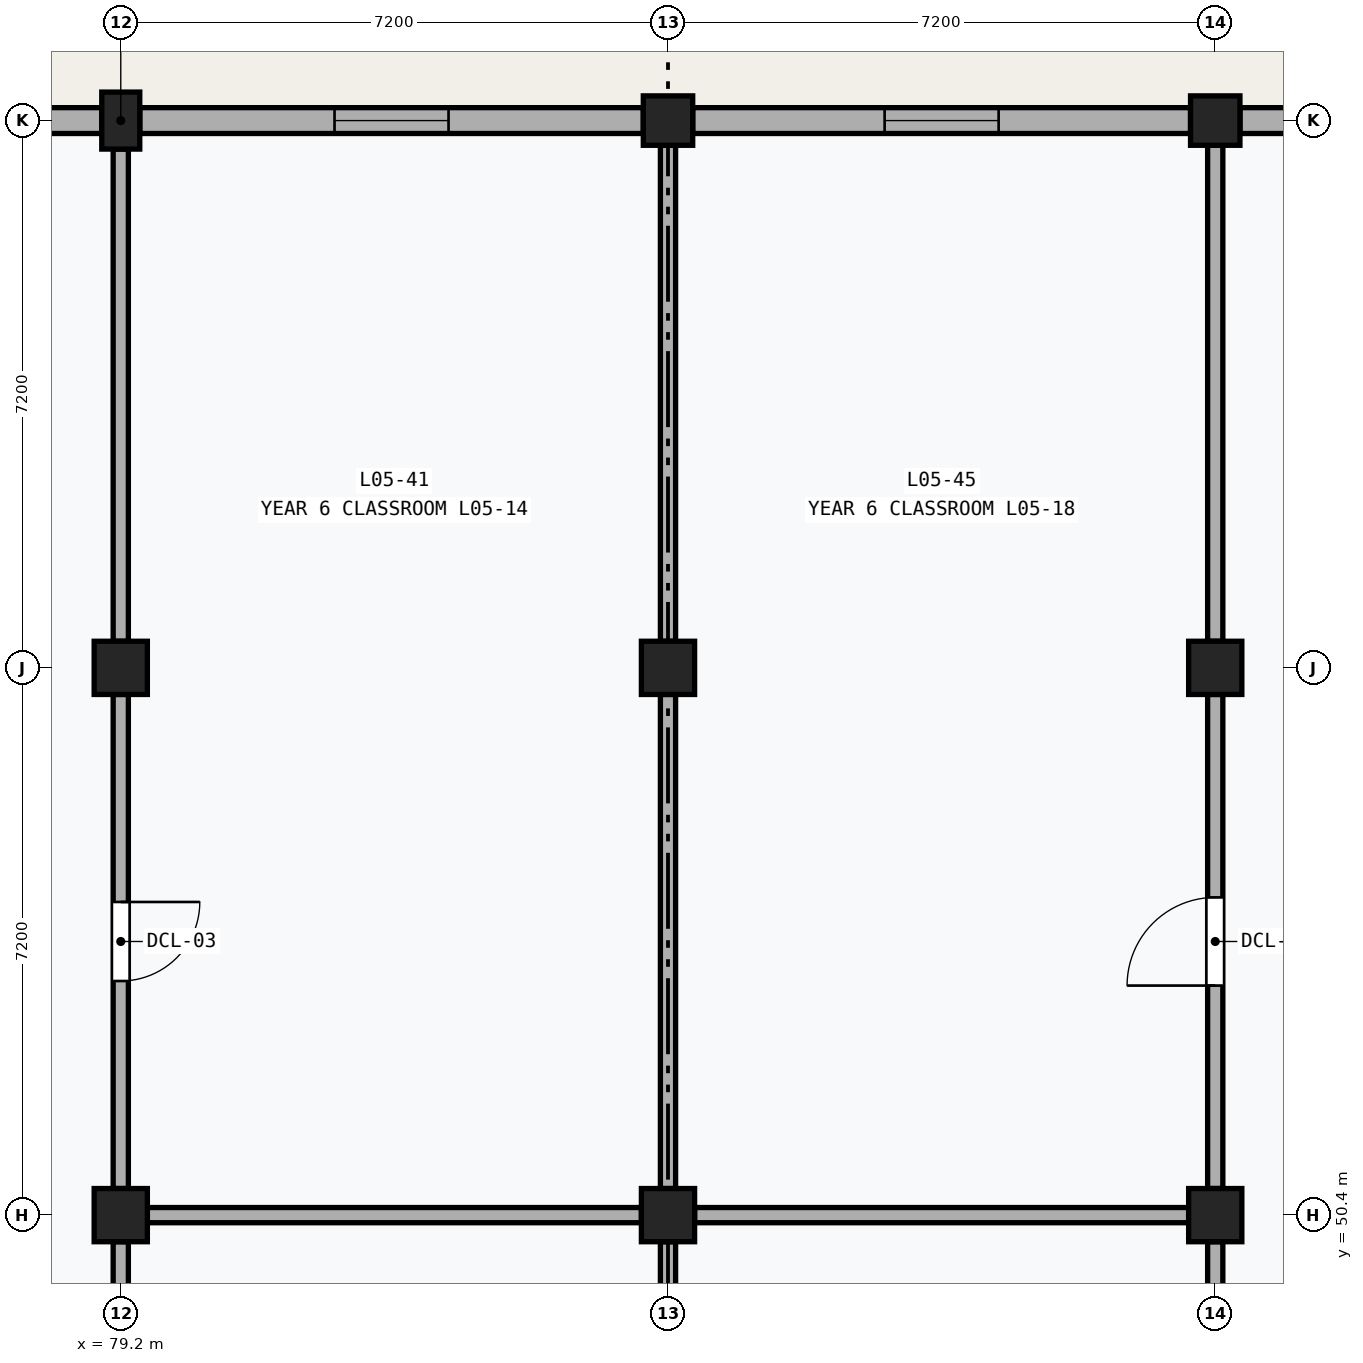
"""IFC4 building model, lengths in metres.
Left out: names, types, materials, properties, quantities, classifications, styles, units other than length and angle.
Written with IfcOpenShell. Run it as: python <this file> out.ifc"""

import sys

from ifc_helpers import new_model, si_unit, direction, frame, frame_2d, origin, origin_2d, place, context, subcontext, project, spatial, rectangle, extrude, element, fill, save


model = new_model("IFC4")
c1 = context("Model", 3, precision=1e-05, world=origin(), true_north=direction((0.0, 1.0)))
c2 = subcontext(c1, "Body", "Model", "MODEL_VIEW")
j1 = project(units=[si_unit("LENGTHUNIT", "METRE"), si_unit("PLANEANGLEUNIT", "RADIAN")], contexts=[c1])
p1 = place(None, origin())
s1 = spatial("IfcSite", under=j1, at=p1, CompositionType="ELEMENT")
p2 = place(p1, origin())
s2 = spatial("IfcBuilding", under=s1, at=p2, CompositionType="ELEMENT")
p3 = place(p2, frame((0.0, 0.0, 22.6)))
s3 = spatial("IfcBuildingStorey", under=s2, at=p3, CompositionType="ELEMENT", Elevation=22.6)
for number, where, z_axis, x_axis in (
    (1, (79.2, 50.4, 0.0), (0.0, 0.0, 1.0), (1.0, 0.0, 0.0)),
    (2, (79.2, 57.6, 0.0), (0.0, 0.0, 1.0), (1.0, 0.0, 0.0)),
):
    element("IfcColumn", number, at=place(p3, frame(where, z_axis=z_axis, x_axis=x_axis)), inside=s3, PredefinedType="COLUMN", context=c2, shape_type="SweptSolid", body=[
        extrude(rectangle(XDim=0.7, YDim=0.7, at=origin_2d()), origin(), (0.0, 0.0, 1.0), 4.0),
    ])
p4 = place(p3, frame((79.2, 64.8, 0.0), z_axis=(0.0, 0.0, 1.0), x_axis=(1.0, 0.0, 0.0)))
e3 = element("IfcColumn", 3, at=p4, inside=s3, PredefinedType="PILASTER", context=c2, shape_type="SweptSolid", body=[
    extrude(rectangle(XDim=0.5, YDim=0.75, at=origin_2d()), origin(), (0.0, 0.0, 1.0), 4.0),
])
for number, where, z_axis, x_axis in (
    (4, (86.4, 50.4, 0.0), (0.0, 0.0, 1.0), (1.0, 0.0, 0.0)),
    (5, (86.4, 57.6, 0.0), (0.0, 0.0, 1.0), (1.0, 0.0, 0.0)),
):
    element("IfcColumn", number, at=place(p3, frame(where, z_axis=z_axis, x_axis=x_axis)), inside=s3, PredefinedType="COLUMN", context=c2, shape_type="SweptSolid", body=[
        extrude(rectangle(XDim=0.7, YDim=0.7, at=origin_2d()), origin(), (0.0, 0.0, 1.0), 4.0),
    ])
p5 = place(p3, frame((86.4, 64.8, 0.0), z_axis=(0.0, 0.0, 1.0), x_axis=(1.0, 0.0, 0.0)))
e6 = element("IfcColumn", 6, at=p5, inside=s3, PredefinedType="COLUMN", context=c2, shape_type="SweptSolid", body=[
    extrude(rectangle(XDim=0.65, YDim=0.65, at=origin_2d()), origin(), (0.0, 0.0, 1.0), 4.0),
])
for number, where, z_axis, x_axis in (
    (7, (93.6, 50.4, 0.0), (0.0, 0.0, 1.0), (1.0, 0.0, 0.0)),
    (8, (93.6, 57.6, 0.0), (0.0, 0.0, 1.0), (1.0, 0.0, 0.0)),
):
    element("IfcColumn", number, at=place(p3, frame(where, z_axis=z_axis, x_axis=x_axis)), inside=s3, PredefinedType="COLUMN", context=c2, shape_type="SweptSolid", body=[
        extrude(rectangle(XDim=0.7, YDim=0.7, at=origin_2d()), origin(), (0.0, 0.0, 1.0), 4.0),
    ])
p6 = place(p3, frame((93.6, 64.8, 0.0), z_axis=(0.0, 0.0, 1.0), x_axis=(1.0, 0.0, 0.0)))
e9 = element("IfcColumn", 9, at=p6, inside=s3, PredefinedType="COLUMN", context=c2, shape_type="SweptSolid", body=[
    extrude(rectangle(XDim=0.65, YDim=0.65, at=origin_2d()), origin(), (0.0, 0.0, 1.0), 4.0),
])
p7 = place(p3, frame((72.325, 64.8, 0.0), z_axis=(0.0, 0.0, 1.0), x_axis=(1.0, 0.0, 0.0)))
e10 = element("IfcWall", 10, at=p7, inside=s3, PredefinedType="SOLIDWALL", context=c2, shape_type="SweptSolid", body=[
    extrude(rectangle(XDim=6.625, YDim=0.34, at=frame_2d((3.312, 0.0))), origin(), (0.0, 0.0, 1.0), 3.12),
])
p8 = place(p7, frame((2.562, 0.0, 1.1)))
e11 = element("IfcOpeningElement", 11, at=p8, cuts=e10, PredefinedType="OPENING", context=c2, shape_type="SweptSolid", body=[
    extrude(rectangle(XDim=1.5, YDim=1.35, at=frame_2d((0.75, 0.675))), frame((0.0, 0.182, 0.0), z_axis=(0.0, -1.0, 0.0), x_axis=(1.0, 0.0, 0.0)), (0.0, 0.0, 1.0), 0.364),
])
p9 = place(p3, frame((79.45, 64.8, 0.0), z_axis=(0.0, 0.0, 1.0), x_axis=(1.0, 0.0, 0.0)))
e12 = element("IfcWall", 12, at=p9, inside=s3, PredefinedType="SOLIDWALL", context=c2, shape_type="SweptSolid", body=[
    extrude(rectangle(XDim=6.625, YDim=0.34, at=frame_2d((3.312, 0.0))), origin(), (0.0, 0.0, 1.0), 3.12),
])
p10 = place(p9, frame((2.562, 0.0, 1.1)))
e13 = element("IfcOpeningElement", 13, at=p10, cuts=e12, PredefinedType="OPENING", context=c2, shape_type="SweptSolid", body=[
    extrude(rectangle(XDim=1.5, YDim=1.35, at=frame_2d((0.75, 0.675))), frame((0.0, 0.182, 0.0), z_axis=(0.0, -1.0, 0.0), x_axis=(1.0, 0.0, 0.0)), (0.0, 0.0, 1.0), 0.364),
])
p11 = place(p3, frame((86.725, 64.8, 0.0), z_axis=(0.0, 0.0, 1.0), x_axis=(1.0, 0.0, 0.0)))
e14 = element("IfcWall", 14, at=p11, inside=s3, PredefinedType="SOLIDWALL", context=c2, shape_type="SweptSolid", body=[
    extrude(rectangle(XDim=6.55, YDim=0.34, at=frame_2d((3.275, 0.0))), origin(), (0.0, 0.0, 1.0), 3.12),
])
p12 = place(p11, frame((2.525, 0.0, 1.1)))
e15 = element("IfcOpeningElement", 15, at=p12, cuts=e14, PredefinedType="OPENING", context=c2, shape_type="SweptSolid", body=[
    extrude(rectangle(XDim=1.5, YDim=1.35, at=frame_2d((0.75, 0.675))), frame((0.0, 0.182, 0.0), z_axis=(0.0, -1.0, 0.0), x_axis=(1.0, 0.0, 0.0)), (0.0, 0.0, 1.0), 0.364),
])
p13 = place(p3, frame((93.925, 64.8, 0.0), z_axis=(0.0, 0.0, 1.0), x_axis=(1.0, 0.0, 0.0)))
e16 = element("IfcWall", 16, at=p13, inside=s3, PredefinedType="SOLIDWALL", context=c2, shape_type="SweptSolid", body=[
    extrude(rectangle(XDim=6.55, YDim=0.34, at=frame_2d((3.275, 0.0))), origin(), (0.0, 0.0, 1.0), 3.12),
])
p14 = place(p13, frame((2.525, 0.0, 1.1)))
e17 = element("IfcOpeningElement", 17, at=p14, cuts=e16, PredefinedType="OPENING", context=c2, shape_type="SweptSolid", body=[
    extrude(rectangle(XDim=1.5, YDim=1.35, at=frame_2d((0.75, 0.675))), frame((0.0, 0.182, 0.0), z_axis=(0.0, -1.0, 0.0), x_axis=(1.0, 0.0, 0.0)), (0.0, 0.0, 1.0), 0.364),
])
for number, where, z_axis, x_axis in (
    (18, (79.55, 50.4, 0.0), (0.0, 0.0, 1.0), (1.0, 0.0, 0.0)),
    (19, (79.2, 43.55, 0.0), (0.0, 0.0, 1.0), (0.0, 1.0, 0.0)),
    (20, (86.4, 43.55, 0.0), (0.0, 0.0, 1.0), (0.0, 1.0, 0.0)),
):
    element("IfcWall", number, at=place(p3, frame(where, z_axis=z_axis, x_axis=x_axis)), inside=s3, PredefinedType="PARTITIONING", context=c2, shape_type="SweptSolid", body=[
        extrude(rectangle(XDim=6.5, YDim=0.2, at=frame_2d((3.25, 0.0))), origin(), (0.0, 0.0, 1.0), 2.98),
    ])
p15 = place(p3, frame((79.2, 50.75, 0.0), z_axis=(0.0, 0.0, 1.0), x_axis=(0.0, 1.0, 0.0)))
e21 = element("IfcWall", 21, at=p15, inside=s3, PredefinedType="PARTITIONING", context=c2, shape_type="SweptSolid", body=[
    extrude(rectangle(XDim=6.5, YDim=0.2, at=frame_2d((3.25, 0.0))), origin(), (0.0, 0.0, 1.0), 2.98),
])
p16 = place(p15, frame((2.73, 0.0, 0.0)))
e22 = element("IfcOpeningElement", 22, at=p16, cuts=e21, PredefinedType="OPENING", context=c2, shape_type="SweptSolid", body=[
    extrude(rectangle(XDim=1.04, YDim=2.14, at=frame_2d((0.52, 1.07))), frame((0.0, 0.112, 0.0), z_axis=(0.0, -1.0, 0.0), x_axis=(1.0, 0.0, 0.0)), (0.0, 0.0, 1.0), 0.224),
])
p17 = place(p3, frame((86.4, 50.75, 0.0), z_axis=(0.0, 0.0, 1.0), x_axis=(0.0, 1.0, 0.0)))
e23 = element("IfcWall", 23, at=p17, inside=s3, PredefinedType="PARTITIONING", context=c2, shape_type="SweptSolid", body=[
    extrude(rectangle(XDim=6.5, YDim=0.2, at=frame_2d((3.25, 0.0))), origin(), (0.0, 0.0, 1.0), 2.98),
])
p18 = place(p3, frame((79.2, 57.95, 0.0), z_axis=(0.0, 0.0, 1.0), x_axis=(0.0, 1.0, 0.0)))
e24 = element("IfcWall", 24, at=p18, inside=s3, PredefinedType="PARTITIONING", context=c2, shape_type="SweptSolid", body=[
    extrude(rectangle(XDim=6.475, YDim=0.2, at=frame_2d((3.238, 0.0))), origin(), (0.0, 0.0, 1.0), 2.98),
])
p19 = place(p3, frame((86.4, 57.95, 0.0), z_axis=(0.0, 0.0, 1.0), x_axis=(0.0, 1.0, 0.0)))
e25 = element("IfcWall", 25, at=p19, inside=s3, PredefinedType="PARTITIONING", context=c2, shape_type="SweptSolid", body=[
    extrude(rectangle(XDim=6.525, YDim=0.2, at=frame_2d((3.263, 0.0))), origin(), (0.0, 0.0, 1.0), 2.98),
])
for number, where, z_axis, x_axis in (
    (26, (86.75, 50.4, 0.0), (0.0, 0.0, 1.0), (1.0, 0.0, 0.0)),
    (27, (93.6, 43.55, 0.0), (0.0, 0.0, 1.0), (0.0, 1.0, 0.0)),
):
    element("IfcWall", number, at=place(p3, frame(where, z_axis=z_axis, x_axis=x_axis)), inside=s3, PredefinedType="PARTITIONING", context=c2, shape_type="SweptSolid", body=[
        extrude(rectangle(XDim=6.5, YDim=0.2, at=frame_2d((3.25, 0.0))), origin(), (0.0, 0.0, 1.0), 2.98),
    ])
p20 = place(p3, frame((93.6, 50.75, 0.0), z_axis=(0.0, 0.0, 1.0), x_axis=(0.0, 1.0, 0.0)))
e28 = element("IfcWall", 28, at=p20, inside=s3, PredefinedType="PARTITIONING", context=c2, shape_type="SweptSolid", body=[
    extrude(rectangle(XDim=6.5, YDim=0.2, at=frame_2d((3.25, 0.0))), origin(), (0.0, 0.0, 1.0), 2.98),
])
p21 = place(p20, frame((2.67, 0.0, 0.0)))
e29 = element("IfcOpeningElement", 29, at=p21, cuts=e28, PredefinedType="OPENING", context=c2, shape_type="SweptSolid", body=[
    extrude(rectangle(XDim=1.16, YDim=2.22, at=frame_2d((0.58, 1.11))), frame((0.0, 0.112, 0.0), z_axis=(0.0, -1.0, 0.0), x_axis=(1.0, 0.0, 0.0)), (0.0, 0.0, 1.0), 0.224),
])
p22 = place(p3, frame((93.6, 57.95, 0.0), z_axis=(0.0, 0.0, 1.0), x_axis=(0.0, 1.0, 0.0)))
e30 = element("IfcWall", 30, at=p22, inside=s3, PredefinedType="PARTITIONING", context=c2, shape_type="SweptSolid", body=[
    extrude(rectangle(XDim=6.525, YDim=0.2, at=frame_2d((3.263, 0.0))), origin(), (0.0, 0.0, 1.0), 2.98),
])
p23 = place(p10, origin())
e31 = element("IfcWindow", 31, at=p23, inside=s3, PartitioningType="SINGLE_PANEL", PredefinedType="WINDOW", context=c2, shape_type="SweptSolid", body=[
    extrude(rectangle(XDim=1.5, YDim=1.35, at=frame_2d((0.75, 0.675))), frame((0.0, 0.03, 0.0), z_axis=(0.0, -1.0, 0.0), x_axis=(1.0, 0.0, 0.0)), (0.0, 0.0, 1.0), 0.06),
])
fill(e13, e31)
p24 = place(p12, origin())
e32 = element("IfcWindow", 32, at=p24, inside=s3, PartitioningType="SINGLE_PANEL", PredefinedType="WINDOW", context=c2, shape_type="SweptSolid", body=[
    extrude(rectangle(XDim=1.5, YDim=1.35, at=frame_2d((0.75, 0.675))), frame((0.0, 0.03, 0.0), z_axis=(0.0, -1.0, 0.0), x_axis=(1.0, 0.0, 0.0)), (0.0, 0.0, 1.0), 0.06),
])
fill(e15, e32)
p25 = place(p16, frame((1.04, 0.0, 0.0), z_axis=(0.0, 0.0, 1.0), x_axis=(-1.0, 0.0, 0.0)))
e33 = element("IfcDoor", 33, at=p25, inside=s3, OperationType="SINGLE_SWING_LEFT", PredefinedType="DOOR", context=c2, shape_type="SweptSolid", body=[
    extrude(rectangle(XDim=1.04, YDim=2.14, at=frame_2d((0.52, 1.07))), frame((0.0, 0.025, 0.0), z_axis=(0.0, -1.0, 0.0), x_axis=(1.0, 0.0, 0.0)), (0.0, 0.0, 1.0), 0.05),
])
fill(e22, e33)
p26 = place(p21, origin())
e34 = element("IfcDoor", 34, at=p26, inside=s3, OperationType="SINGLE_SWING_LEFT", PredefinedType="DOOR", context=c2, shape_type="SweptSolid", body=[
    extrude(rectangle(XDim=1.16, YDim=2.22, at=frame_2d((0.58, 1.11))), frame((0.0, 0.025, 0.0), z_axis=(0.0, -1.0, 0.0), x_axis=(1.0, 0.0, 0.0)), (0.0, 0.0, 1.0), 0.05),
])
fill(e29, e34)
save(model, sys.argv[1])
